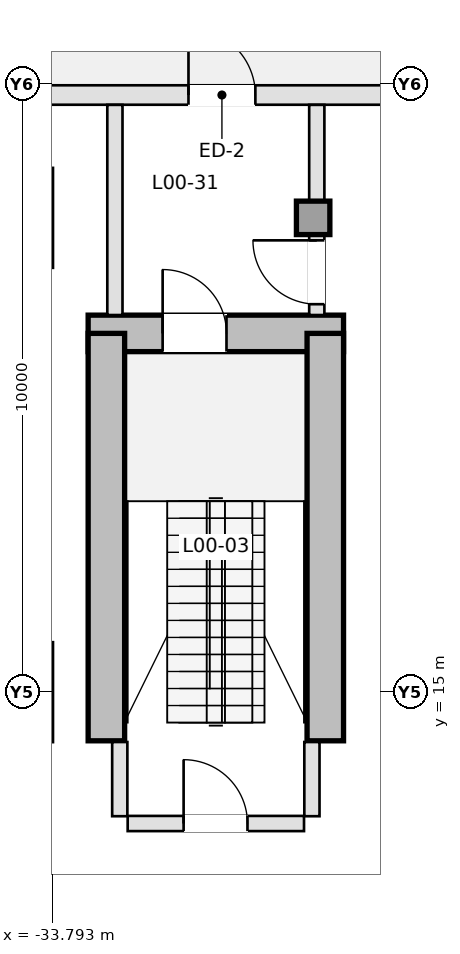
"""IFC4 building model, lengths in metres.
Left out: names, types, materials, properties, quantities, classifications, styles, units other than length and angle.
Written with IfcOpenShell. Run it as: python <this file> out.ifc"""

import sys

from ifc_helpers import new_model, si_unit, direction, frame, frame_2d, origin, origin_2d, place, context, subcontext, project, spatial, rectangle, extrude, element, fill, save


model = new_model("IFC4")
c1 = context("Model", 3, precision=1e-05, world=origin(), true_north=direction((0.0, 1.0)))
c2 = subcontext(c1, "Body", "Model", "MODEL_VIEW")
j1 = project(units=[si_unit("LENGTHUNIT", "METRE"), si_unit("PLANEANGLEUNIT", "RADIAN")], contexts=[c1])
p1 = place(None, origin())
s1 = spatial("IfcSite", under=j1, at=p1, CompositionType="ELEMENT")
p2 = place(p1, origin())
s2 = spatial("IfcBuilding", under=s1, at=p2, CompositionType="ELEMENT")
p3 = place(p2, origin())
s3 = spatial("IfcBuildingStorey", under=s2, at=p3, CompositionType="ELEMENT", Elevation=0.0)
p4 = place(p3, frame((-33.2, 20.9, 0.0), z_axis=(0.0, 0.0, 1.0), x_axis=(1.0, 0.0, 0.0)))
e1 = element("IfcWall", 1, at=p4, inside=s3, PredefinedType="SHEAR", context=c2, shape_type="SweptSolid", body=[
    extrude(rectangle(XDim=4.2, YDim=0.6, at=frame_2d((2.1, 0.0))), origin(), (0.0, 0.0, 1.0), 5.0),
])
p5 = place(p4, frame((1.225, 0.0, 0.0)))
e2 = element("IfcOpeningElement", 2, at=p5, cuts=e1, PredefinedType="OPENING", context=c2, shape_type="SweptSolid", body=[
    extrude(rectangle(XDim=1.05, YDim=2.15, at=frame_2d((0.525, 1.075))), frame((0.0, 0.31, 0.0), z_axis=(0.0, -1.0, 0.0), x_axis=(1.0, 0.0, 0.0)), (0.0, 0.0, 1.0), 0.62),
])
for number, where, z_axis, x_axis in (
    (3, (-32.9, 14.2, 0.0), (0.0, 0.0, 1.0), (0.0, 1.0, 0.0)),
    (4, (-29.3, 14.2, 0.0), (0.0, 0.0, 1.0), (0.0, 1.0, 0.0)),
):
    element("IfcWall", number, at=place(p3, frame(where, z_axis=z_axis, x_axis=x_axis)), inside=s3, PredefinedType="SHEAR", context=c2, shape_type="SweptSolid", body=[
        extrude(rectangle(XDim=6.7, YDim=0.6, at=frame_2d((3.35, 0.0))), origin(), (0.0, 0.0, 1.0), 5.0),
    ])
p6 = place(p3, frame((-29.5, 22.8, 0.0), z_axis=(0.0, 0.0, 1.0), x_axis=(1.0, 0.0, 0.0)))
e5 = element("IfcColumn", 5, at=p6, inside=s3, PredefinedType="PILASTER", context=c2, shape_type="SweptSolid", body=[
    extrude(rectangle(XDim=0.55, YDim=0.55, at=origin_2d()), origin(), (0.0, 0.0, 1.0), 5.0),
])
p7 = place(p3, frame((-35.0, 24.82, 0.0), z_axis=(0.0, 0.0, 1.0), x_axis=(1.0, 0.0, 0.0)))
e6 = element("IfcWall", 6, at=p7, inside=s3, PredefinedType="STANDARD", context=c2, shape_type="SweptSolid", body=[
    extrude(rectangle(XDim=10.4, YDim=0.32, at=frame_2d((5.2, 0.0))), origin(), (0.0, 0.0, 1.0), 4.7),
])
p8 = place(p7, frame((3.45, 0.0, 0.0)))
e7 = element("IfcOpeningElement", 7, at=p8, cuts=e6, PredefinedType="OPENING", context=c2, shape_type="SweptSolid", body=[
    extrude(rectangle(XDim=1.1, YDim=2.2, at=frame_2d((0.55, 1.1))), frame((0.0, 0.17, 0.0), z_axis=(0.0, -1.0, 0.0), x_axis=(1.0, 0.0, 0.0)), (0.0, 0.0, 1.0), 0.34),
])
p9 = place(p7, frame((6.8, 0.0, 1.1)))
e8 = element("IfcOpeningElement", 8, at=p9, cuts=e6, PredefinedType="OPENING", context=c2, shape_type="SweptSolid", body=[
    extrude(rectangle(XDim=2.1, YDim=2.4, at=frame_2d((1.05, 1.2))), frame((0.0, 0.17, 0.0), z_axis=(0.0, -1.0, 0.0), x_axis=(1.0, 0.0, 0.0)), (0.0, 0.0, 1.0), 0.34),
])
p10 = place(p3, frame((-32.55, 12.84, 0.0), z_axis=(0.0, 0.0, 1.0), x_axis=(1.0, 0.0, 0.0)))
e9 = element("IfcWall", 9, at=p10, inside=s3, PredefinedType="PARTITIONING", context=c2, shape_type="SweptSolid", body=[
    extrude(rectangle(XDim=2.9, YDim=0.25, at=frame_2d((1.45, 0.0))), origin(), (0.0, 0.0, 1.0), 4.7),
])
p11 = place(p10, frame((0.92, 0.0, 0.0)))
e10 = element("IfcOpeningElement", 10, at=p11, cuts=e9, PredefinedType="OPENING", context=c2, shape_type="SweptSolid", body=[
    extrude(rectangle(XDim=1.05, YDim=2.15, at=frame_2d((0.525, 1.075))), frame((0.0, 0.135, 0.0), z_axis=(0.0, -1.0, 0.0), x_axis=(1.0, 0.0, 0.0)), (0.0, 0.0, 1.0), 0.27),
])
for number, where, z_axis, x_axis in (
    (11, (-32.68, 12.96, 0.0), (0.0, 0.0, 1.0), (0.0, 1.0, 0.0)),
    (12, (-29.52, 12.96, 0.0), (0.0, 0.0, 1.0), (0.0, 1.0, 0.0)),
):
    element("IfcWall", number, at=place(p3, frame(where, z_axis=z_axis, x_axis=x_axis)), inside=s3, PredefinedType="PARTITIONING", context=c2, shape_type="SweptSolid", body=[
        extrude(rectangle(XDim=1.22, YDim=0.25, at=frame_2d((0.61, 0.0))), origin(), (0.0, 0.0, 1.0), 4.7),
    ])
p12 = place(p3, frame((-32.76, 21.202, 0.0), z_axis=(0.0, 0.0, 1.0), x_axis=(0.0, 1.0, 0.0)))
e13 = element("IfcWall", 13, at=p12, inside=s3, PredefinedType="PARTITIONING", context=c2, shape_type="SweptSolid", body=[
    extrude(rectangle(XDim=3.456, YDim=0.25, at=frame_2d((1.728, 0.0))), origin(), (0.0, 0.0, 1.0), 4.7),
])
p13 = place(p3, frame((-29.44, 21.202, 0.0), z_axis=(0.0, 0.0, 1.0), x_axis=(0.0, 1.0, 0.0)))
e14 = element("IfcWall", 14, at=p13, inside=s3, PredefinedType="PARTITIONING", context=c2, shape_type="SweptSolid", body=[
    extrude(rectangle(XDim=1.321, YDim=0.25, at=frame_2d((0.661, 0.0))), origin(), (0.0, 0.0, 1.0), 4.7),
])
p14 = place(p13, frame((0.178, 0.0, 0.0)))
e15 = element("IfcOpeningElement", 15, at=p14, cuts=e14, PredefinedType="OPENING", context=c2, shape_type="SweptSolid", body=[
    extrude(rectangle(XDim=1.05, YDim=2.15, at=frame_2d((0.525, 1.075))), frame((0.0, 0.135, 0.0), z_axis=(0.0, -1.0, 0.0), x_axis=(1.0, 0.0, 0.0)), (0.0, 0.0, 1.0), 0.27),
])
p15 = place(p3, frame((-29.44, 23.077, 0.0), z_axis=(0.0, 0.0, 1.0), x_axis=(0.0, 1.0, 0.0)))
e16 = element("IfcWall", 16, at=p15, inside=s3, PredefinedType="PARTITIONING", context=c2, shape_type="SweptSolid", body=[
    extrude(rectangle(XDim=1.581, YDim=0.25, at=frame_2d((0.791, 0.0))), origin(), (0.0, 0.0, 1.0), 4.7),
])
p16 = place(p8, origin())
e17 = element("IfcDoor", 17, at=p16, inside=s3, OperationType="SINGLE_SWING_LEFT", PredefinedType="DOOR", context=c2, shape_type="SweptSolid", body=[
    extrude(rectangle(XDim=1.1, YDim=2.2, at=frame_2d((0.55, 1.1))), frame((0.0, 0.025, 0.0), z_axis=(0.0, -1.0, 0.0), x_axis=(1.0, 0.0, 0.0)), (0.0, 0.0, 1.0), 0.05),
])
fill(e7, e17)
p17 = place(p11, origin())
e18 = element("IfcDoor", 18, at=p17, inside=s3, OperationType="SINGLE_SWING_LEFT", PredefinedType="DOOR", context=c2, shape_type="SweptSolid", body=[
    extrude(rectangle(XDim=1.05, YDim=2.15, at=frame_2d((0.525, 1.075))), frame((0.0, 0.025, 0.0), z_axis=(0.0, -1.0, 0.0), x_axis=(1.0, 0.0, 0.0)), (0.0, 0.0, 1.0), 0.05),
])
fill(e10, e18)
p18 = place(p14, origin())
e19 = element("IfcDoor", 19, at=p18, inside=s3, OperationType="SINGLE_SWING_RIGHT", PredefinedType="DOOR", context=c2, shape_type="SweptSolid", body=[
    extrude(rectangle(XDim=1.05, YDim=2.15, at=frame_2d((0.525, 1.075))), frame((0.0, 0.025, 0.0), z_axis=(0.0, -1.0, 0.0), x_axis=(1.0, 0.0, 0.0)), (0.0, 0.0, 1.0), 0.05),
])
fill(e15, e19)
p19 = place(p5, origin())
e20 = element("IfcDoor", 20, at=p19, inside=s3, OperationType="SINGLE_SWING_LEFT", PredefinedType="DOOR", context=c2, shape_type="SweptSolid", body=[
    extrude(rectangle(XDim=1.05, YDim=2.15, at=frame_2d((0.525, 1.075))), frame((0.0, 0.025, 0.0), z_axis=(0.0, -1.0, 0.0), x_axis=(1.0, 0.0, 0.0)), (0.0, 0.0, 1.0), 0.05),
])
fill(e2, e20)
save(model, sys.argv[1])
